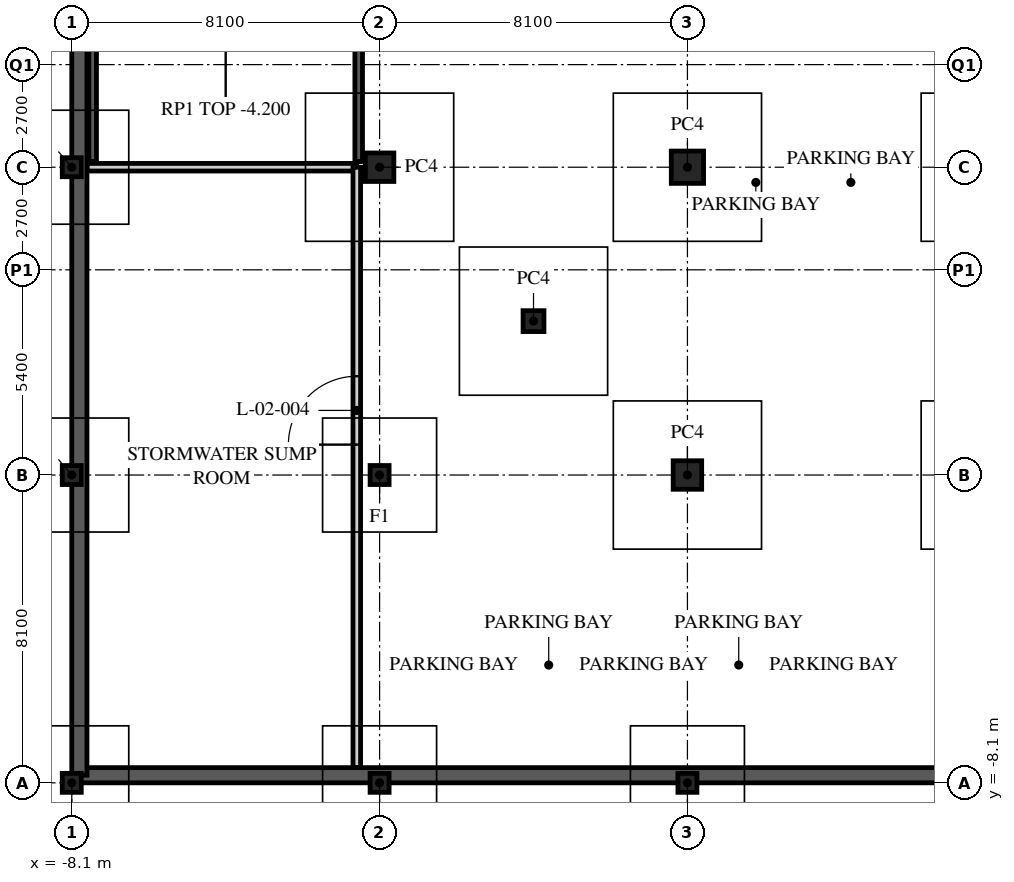
"""IFC4 building model, lengths in metres.
Left out: names, types, materials, properties, quantities, classifications, styles, units other than length and angle.
Written with IfcOpenShell. Run it as: python <this file> out.ifc"""

import sys

from ifc_helpers import new_model, si_unit, direction, frame, frame_2d, origin, origin_2d, place, context, subcontext, project, spatial, rectangle, hollow_rectangle, extrude, element, fill, save


model = new_model("IFC4")
c1 = context("Model", 3, precision=1e-05, world=origin(), true_north=direction((0.0, 1.0)))
c2 = subcontext(c1, "Body", "Model", "MODEL_VIEW")
j1 = project(units=[si_unit("LENGTHUNIT", "METRE"), si_unit("PLANEANGLEUNIT", "RADIAN")], contexts=[c1])
p1 = place(None, origin())
s1 = spatial("IfcSite", under=j1, at=p1, CompositionType="ELEMENT")
p2 = place(p1, origin())
s2 = spatial("IfcBuilding", under=s1, at=p2, CompositionType="ELEMENT")
p3 = place(p2, frame((0.0, 0.0, -8.4)))
s3 = spatial("IfcBuildingStorey", under=s2, at=p3, CompositionType="ELEMENT", Elevation=-8.4)
for number, where, z_axis, x_axis in (
    (1, (-8.1, -8.1, 0.0), (0.0, 0.0, 1.0), (1.0, 0.0, 0.0)),
    (2, (-8.1, 0.0, 0.0), (0.0, 0.0, 1.0), (1.0, 0.0, 0.0)),
    (3, (-8.1, 8.1, 0.0), (0.0, 0.0, 1.0), (1.0, 0.0, 0.0)),
    (4, (0.0, -8.1, 0.0), (0.0, 0.0, 1.0), (1.0, 0.0, 0.0)),
    (5, (0.0, 0.0, 0.0), (0.0, 0.0, 1.0), (1.0, 0.0, 0.0)),
):
    element("IfcColumn", number, at=place(p3, frame(where, z_axis=z_axis, x_axis=x_axis)), inside=s3, PredefinedType="COLUMN", context=c2, shape_type="SweptSolid", body=[
        extrude(hollow_rectangle(XDim=0.5, YDim=0.5, WallThickness=0.03, at=origin_2d()), origin(), (0.0, 0.0, 1.0), 4.2),
    ])
p4 = place(p3, frame((0.0, 8.1, 0.0), z_axis=(0.0, 0.0, 1.0), x_axis=(1.0, 0.0, 0.0)))
e6 = element("IfcColumn", 6, at=p4, inside=s3, PredefinedType="COLUMN", context=c2, shape_type="SweptSolid", body=[
    extrude(hollow_rectangle(XDim=0.75, YDim=0.75, WallThickness=0.07, at=origin_2d()), origin(), (0.0, 0.0, 1.0), 4.2),
])
p5 = place(p3, frame((4.05, 4.05, 0.0), z_axis=(0.0, 0.0, 1.0), x_axis=(1.0, 0.0, 0.0)))
e7 = element("IfcColumn", 7, at=p5, inside=s3, PredefinedType="COLUMN", context=c2, shape_type="SweptSolid", body=[
    extrude(hollow_rectangle(XDim=0.55, YDim=0.55, WallThickness=0.05, at=origin_2d()), origin(), (0.0, 0.0, 1.0), 4.2),
])
p6 = place(p3, frame((8.1, -8.1, 0.0), z_axis=(0.0, 0.0, 1.0), x_axis=(1.0, 0.0, 0.0)))
e8 = element("IfcColumn", 8, at=p6, inside=s3, PredefinedType="COLUMN", context=c2, shape_type="SweptSolid", body=[
    extrude(hollow_rectangle(XDim=0.5, YDim=0.5, WallThickness=0.03, at=origin_2d()), origin(), (0.0, 0.0, 1.0), 4.2),
])
p7 = place(p3, frame((8.1, 0.0, 0.0), z_axis=(0.0, 0.0, 1.0), x_axis=(1.0, 0.0, 0.0)))
e9 = element("IfcColumn", 9, at=p7, inside=s3, PredefinedType="COLUMN", context=c2, shape_type="SweptSolid", body=[
    extrude(hollow_rectangle(XDim=0.75, YDim=0.75, WallThickness=0.07, at=origin_2d()), origin(), (0.0, 0.0, 1.0), 4.2),
])
p8 = place(p3, frame((8.1, 8.1, 0.0), z_axis=(0.0, 0.0, 1.0), x_axis=(1.0, 0.0, 0.0)))
e10 = element("IfcColumn", 10, at=p8, inside=s3, PredefinedType="COLUMN", context=c2, shape_type="SweptSolid", body=[
    extrude(hollow_rectangle(XDim=0.85, YDim=0.85, WallThickness=0.085, at=origin_2d()), origin(), (0.0, 0.0, 1.0), 4.2),
])
p9 = place(p3, frame((-7.7, 8.1, 0.0), z_axis=(0.0, 0.0, 1.0), x_axis=(1.0, 0.0, 0.0)))
e11 = element("IfcWall", 11, at=p9, inside=s3, PredefinedType="SOLIDWALL", context=c2, shape_type="SweptSolid", body=[
    extrude(rectangle(XDim=7.1, YDim=0.2, at=frame_2d((3.55, 0.0))), origin(), (0.0, 0.0, 1.0), 3.338),
])
p10 = place(p3, frame((-0.6, -7.7, 0.0), z_axis=(0.0, 0.0, 1.0), x_axis=(0.0, 1.0, 0.0)))
e12 = element("IfcWall", 12, at=p10, inside=s3, PredefinedType="SOLIDWALL", context=c2, shape_type="SweptSolid", body=[
    extrude(rectangle(XDim=15.8, YDim=0.2, at=frame_2d((7.9, 0.0))), origin(), (0.0, 0.0, 1.0), 3.95),
])
p11 = place(p10, frame((8.5, 0.0, 0.0)))
e13 = element("IfcOpeningElement", 13, at=p11, cuts=e12, PredefinedType="OPENING", context=c2, shape_type="SweptSolid", body=[
    extrude(rectangle(XDim=1.8, YDim=2.4, at=frame_2d((0.9, 1.2))), frame((0.0, 0.11, 0.0), z_axis=(0.0, -1.0, 0.0), x_axis=(1.0, 0.0, 0.0)), (0.0, 0.0, 1.0), 0.22),
])
p12 = place(p3, frame((-7.9, -7.9, 0.0), z_axis=(0.0, 0.0, 1.0), x_axis=(1.0, 0.0, 0.0)))
e14 = element("IfcWall", 14, at=p12, inside=s3, PredefinedType="SOLIDWALL", context=c2, shape_type="SweptSolid", body=[
    extrude(rectangle(XDim=72.5, YDim=0.4, at=frame_2d((36.25, 0.0))), origin(), (0.0, 0.0, 1.0), 3.338),
])
p13 = place(p3, frame((-7.9, 48.4, 0.0), z_axis=(0.0, 0.0, 1.0), x_axis=(0.0, -1.0, 0.0)))
e15 = element("IfcWall", 15, at=p13, inside=s3, PredefinedType="SOLIDWALL", context=c2, shape_type="SweptSolid", body=[
    extrude(rectangle(XDim=56.3, YDim=0.4, at=frame_2d((28.15, 0.0))), origin(), (0.0, 0.0, 1.0), 3.338),
])
for number, where, z_axis, x_axis in (
    (16, (-0.55, 8.25, 0.0), (0.0, 0.0, 1.0), (0.0, 1.0, 0.0)),
    (17, (-7.55, 8.25, 0.0), (0.0, 0.0, 1.0), (0.0, 1.0, 0.0)),
):
    element("IfcWall", number, at=place(p3, frame(where, z_axis=z_axis, x_axis=x_axis)), inside=s3, PredefinedType="PARTITIONING", context=c2, shape_type="SweptSolid", body=[
        extrude(rectangle(XDim=32.1, YDim=0.2, at=frame_2d((16.05, 0.0))), origin(), (0.0, 0.0, 1.0), 4.2),
    ])
p14 = place(p11, origin())
e18 = element("IfcDoor", 18, at=p14, inside=s3, OperationType="DOUBLE_DOOR_SINGLE_SWING", PredefinedType="DOOR", context=c2, shape_type="SweptSolid", body=[
    extrude(rectangle(XDim=1.8, YDim=2.4, at=frame_2d((0.9, 1.2))), frame((0.0, 0.025, 0.0), z_axis=(0.0, -1.0, 0.0), x_axis=(1.0, 0.0, 0.0)), (0.0, 0.0, 1.0), 0.05),
])
fill(e13, e18)
save(model, sys.argv[1])
